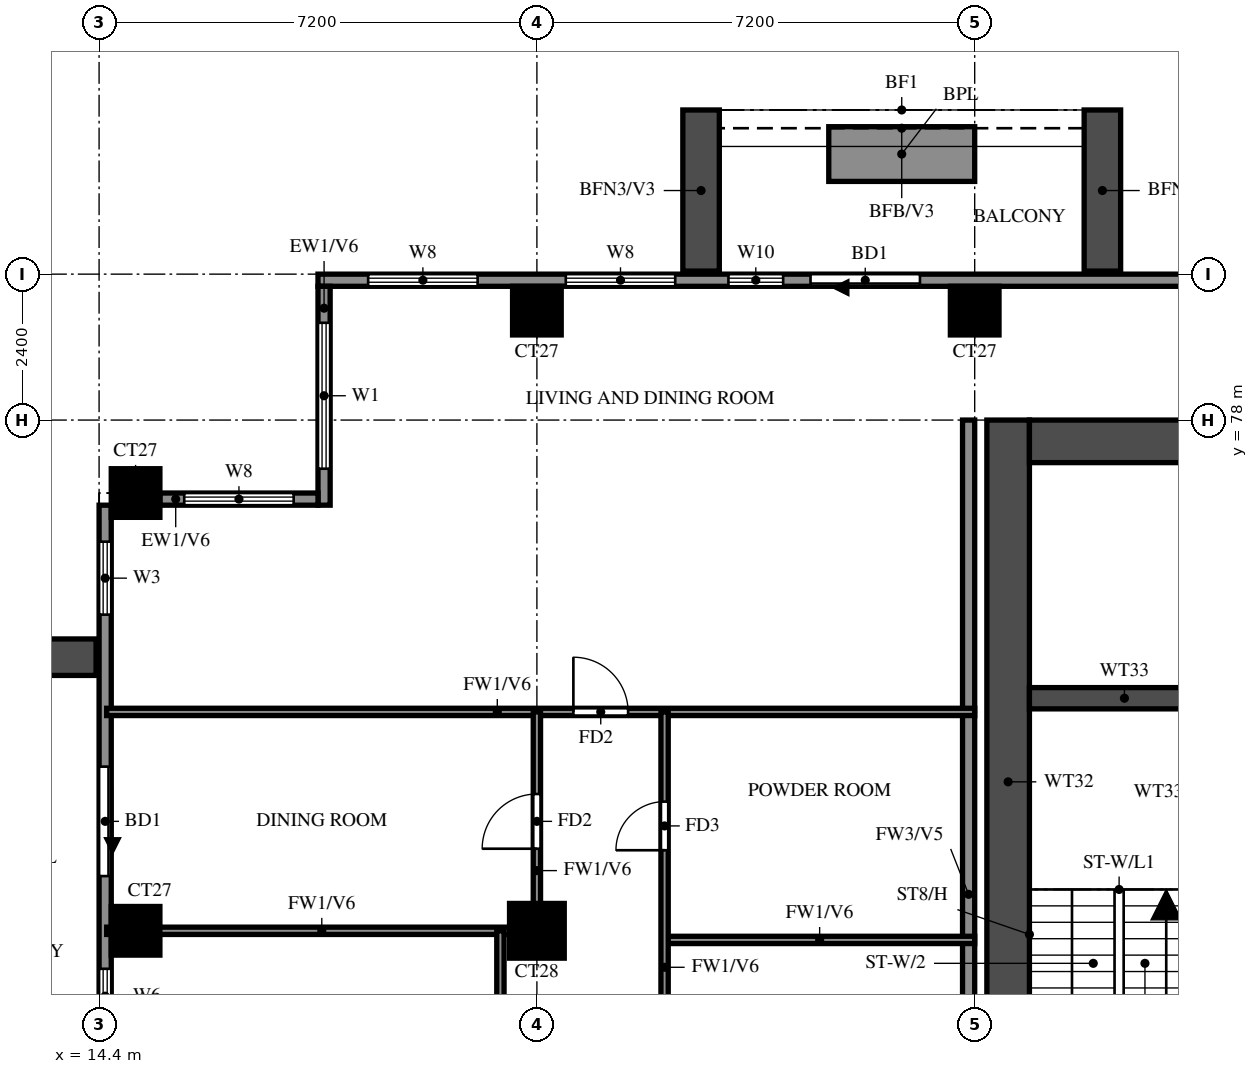
"""IFC4 building model, lengths in metres.
Left out: names, types, materials, properties, quantities, classifications, styles, units other than length and angle.
Written with IfcOpenShell. Run it as: python <this file> out.ifc"""

import sys

from ifc_helpers import new_model, si_unit, direction, frame, frame_2d, origin, origin_2d, place, context, subcontext, project, spatial, rectangle, extrude, source, transform, mapped, element, fill, save


model = new_model("IFC4")
c1 = context("Model", 3, precision=1e-05, world=origin(), true_north=direction((0.0, 1.0)))
c2 = subcontext(c1, "Body", "Model", "MODEL_VIEW")
j1 = project(units=[si_unit("LENGTHUNIT", "METRE"), si_unit("PLANEANGLEUNIT", "RADIAN")], contexts=[c1])
p1 = place(None, origin())
s1 = spatial("IfcSite", under=j1, at=p1, CompositionType="ELEMENT")
p2 = place(p1, origin())
s2 = spatial("IfcBuilding", under=s1, at=p2, CompositionType="ELEMENT")
p3 = place(p2, frame((0.0, 0.0, 202.5)))
s3 = spatial("IfcBuildingStorey", under=s2, at=p3, CompositionType="ELEMENT", Elevation=202.5)
m1 = source(origin(), c2, "Body", "SweptSolid", [
    extrude(rectangle(XDim=0.8, YDim=0.8, at=origin_2d()), origin(), (0.0, 0.0, 1.0), 3.1),
])
p4 = place(p3, frame((15.0, 69.6, 0.0), z_axis=(0.0, 0.0, 1.0), x_axis=(1.0, 0.0, 0.0)))
e1 = element("IfcColumn", 1, at=p4, inside=s3, PredefinedType="COLUMN", context=c2, shape_type="MappedRepresentation", body=[
    mapped(m1, transform((0.0, 0.0, 0.0))),
])
m2 = source(origin(), c2, "Body", "SweptSolid", [
    extrude(rectangle(XDim=0.9, YDim=0.9, at=origin_2d()), origin(), (0.0, 0.0, 1.0), 3.1),
])
p5 = place(p3, frame((21.6, 69.6, 0.0), z_axis=(0.0, 0.0, 1.0), x_axis=(1.0, 0.0, 0.0)))
e2 = element("IfcColumn", 2, at=p5, inside=s3, PredefinedType="COLUMN", context=c2, shape_type="MappedRepresentation", body=[
    mapped(m2, transform((0.0, 0.0, 0.0))),
])
for number, where, z_axis, x_axis in (
    (3, (15.0, 76.8, 0.0), (0.0, 0.0, 1.0), (1.0, 0.0, 0.0)),
    (4, (21.6, 79.8, 0.0), (0.0, 0.0, 1.0), (1.0, 0.0, 0.0)),
    (5, (28.8, 79.8, 0.0), (0.0, 0.0, 1.0), (1.0, 0.0, 0.0)),
):
    element("IfcColumn", number, at=place(p3, frame(where, z_axis=z_axis, x_axis=x_axis)), inside=s3, PredefinedType="COLUMN", context=c2, shape_type="MappedRepresentation", body=[
        mapped(m1, transform((0.0, 0.0, 0.0))),
    ])
p6 = place(p3, frame((29.35, 66.1, 0.0), z_axis=(0.0, 0.0, 1.0), x_axis=(0.0, 1.0, 0.0)))
e6 = element("IfcWall", 6, at=p6, inside=s3, PredefinedType="SHEAR", context=c2, shape_type="SweptSolid", body=[
    extrude(rectangle(XDim=11.9, YDim=0.7, at=frame_2d((5.95, 0.0))), origin(), (0.0, 0.0, 1.0), 3.1),
])
p7 = place(p3, frame((29.7, 77.65, 0.0), z_axis=(0.0, 0.0, 1.0), x_axis=(1.0, 0.0, 0.0)))
e7 = element("IfcWall", 7, at=p7, inside=s3, PredefinedType="SHEAR", context=c2, shape_type="SweptSolid", body=[
    extrude(rectangle(XDim=41.4, YDim=0.7, at=frame_2d((20.7, 0.0))), origin(), (0.0, 0.0, 1.0), 3.1),
])
p8 = place(p3, frame((29.7, 73.425, 0.0), z_axis=(0.0, 0.0, 1.0), x_axis=(1.0, 0.0, 0.0)))
e8 = element("IfcWall", 8, at=p8, inside=s3, PredefinedType="SHEAR", context=c2, shape_type="SweptSolid", body=[
    extrude(rectangle(XDim=3.125, YDim=0.35, at=frame_2d((1.562, 0.0))), origin(), (0.0, 0.0, 1.0), 3.1),
])
p9 = place(p3, frame((82.6, 80.3, 0.0), z_axis=(0.0, 0.0, 1.0), x_axis=(-1.0, 0.0, 0.0)))
e9 = element("IfcWall", 9, at=p9, inside=s3, PredefinedType="SOLIDWALL", context=c2, shape_type="SweptSolid", body=[
    extrude(rectangle(XDim=64.6, YDim=0.2, at=frame_2d((32.3, 0.0))), origin(), (0.0, 0.0, 1.0), 3.1),
])
p10 = place(p9, frame((54.7, 0.0, 0.0)))
e10 = element("IfcOpeningElement", 10, at=p10, cuts=e9, PredefinedType="OPENING", context=c2, shape_type="SweptSolid", body=[
    extrude(rectangle(XDim=1.8, YDim=2.4, at=frame_2d((0.9, 1.2))), frame((0.0, 0.11, 0.0), z_axis=(0.0, -1.0, 0.0), x_axis=(1.0, 0.0, 0.0)), (0.0, 0.0, 1.0), 0.22),
])
p11 = place(p9, frame((56.95, 0.0, 0.6)))
e11 = element("IfcOpeningElement", 11, at=p11, cuts=e9, PredefinedType="OPENING", context=c2, shape_type="SweptSolid", body=[
    extrude(rectangle(XDim=0.9, YDim=2.4, at=frame_2d((0.45, 1.2))), frame((0.0, 0.11, 0.0), z_axis=(0.0, -1.0, 0.0), x_axis=(1.0, 0.0, 0.0)), (0.0, 0.0, 1.0), 0.22),
])
p12 = place(p9, frame((58.725, 0.0, 0.6)))
e12 = element("IfcOpeningElement", 12, at=p12, cuts=e9, PredefinedType="OPENING", context=c2, shape_type="SweptSolid", body=[
    extrude(rectangle(XDim=1.8, YDim=2.4, at=frame_2d((0.9, 1.2))), frame((0.0, 0.11, 0.0), z_axis=(0.0, -1.0, 0.0), x_axis=(1.0, 0.0, 0.0)), (0.0, 0.0, 1.0), 0.22),
])
p13 = place(p9, frame((61.975, 0.0, 0.6)))
e13 = element("IfcOpeningElement", 13, at=p13, cuts=e9, PredefinedType="OPENING", context=c2, shape_type="SweptSolid", body=[
    extrude(rectangle(XDim=1.8, YDim=2.4, at=frame_2d((0.9, 1.2))), frame((0.0, 0.11, 0.0), z_axis=(0.0, -1.0, 0.0), x_axis=(1.0, 0.0, 0.0)), (0.0, 0.0, 1.0), 0.22),
])
p14 = place(p9, frame((0.725, 0.0, 0.6)))
e14 = element("IfcOpeningElement", 14, at=p14, cuts=e9, PredefinedType="OPENING", context=c2, shape_type="SweptSolid", body=[
    extrude(rectangle(XDim=1.8, YDim=2.4, at=frame_2d((0.9, 1.2))), frame((0.0, 0.11, 0.0), z_axis=(0.0, -1.0, 0.0), x_axis=(1.0, 0.0, 0.0)), (0.0, 0.0, 1.0), 0.22),
])
p15 = place(p9, frame((4.35, 0.0, 0.6)))
e15 = element("IfcOpeningElement", 15, at=p15, cuts=e9, PredefinedType="OPENING", context=c2, shape_type="SweptSolid", body=[
    extrude(rectangle(XDim=2.4, YDim=2.4, at=frame_2d((1.2, 1.2))), frame((0.0, 0.11, 0.0), z_axis=(0.0, -1.0, 0.0), x_axis=(1.0, 0.0, 0.0)), (0.0, 0.0, 1.0), 0.22),
])
p16 = place(p9, frame((7.25, 0.0, 0.6)))
e16 = element("IfcOpeningElement", 16, at=p16, cuts=e9, PredefinedType="OPENING", context=c2, shape_type="SweptSolid", body=[
    extrude(rectangle(XDim=2.4, YDim=2.4, at=frame_2d((1.2, 1.2))), frame((0.0, 0.11, 0.0), z_axis=(0.0, -1.0, 0.0), x_axis=(1.0, 0.0, 0.0)), (0.0, 0.0, 1.0), 0.22),
])
p17 = place(p3, frame((18.1, 80.2, 0.0), z_axis=(0.0, 0.0, 1.0), x_axis=(0.0, -1.0, 0.0)))
e17 = element("IfcWall", 17, at=p17, inside=s3, PredefinedType="SOLIDWALL", context=c2, shape_type="SweptSolid", body=[
    extrude(rectangle(XDim=3.6, YDim=0.2, at=frame_2d((1.8, 0.0))), origin(), (0.0, 0.0, 1.0), 3.1),
])
p18 = place(p17, frame((0.6, 0.0, 0.6)))
e18 = element("IfcOpeningElement", 18, at=p18, cuts=e17, PredefinedType="OPENING", context=c2, shape_type="SweptSolid", body=[
    extrude(rectangle(XDim=2.4, YDim=2.4, at=frame_2d((1.2, 1.2))), frame((0.0, 0.11, 0.0), z_axis=(0.0, -1.0, 0.0), x_axis=(1.0, 0.0, 0.0)), (0.0, 0.0, 1.0), 0.22),
])
p19 = place(p3, frame((18.0, 76.7, 0.0), z_axis=(0.0, 0.0, 1.0), x_axis=(-1.0, 0.0, 0.0)))
e19 = element("IfcWall", 19, at=p19, inside=s3, PredefinedType="SOLIDWALL", context=c2, shape_type="SweptSolid", body=[
    extrude(rectangle(XDim=2.6, YDim=0.2, at=frame_2d((1.3, 0.0))), origin(), (0.0, 0.0, 1.0), 3.1),
])
p20 = place(p19, frame((0.4, 0.0, 0.6)))
e20 = element("IfcOpeningElement", 20, at=p20, cuts=e19, PredefinedType="OPENING", context=c2, shape_type="SweptSolid", body=[
    extrude(rectangle(XDim=1.8, YDim=2.4, at=frame_2d((0.9, 1.2))), frame((0.0, 0.11, 0.0), z_axis=(0.0, -1.0, 0.0), x_axis=(1.0, 0.0, 0.0)), (0.0, 0.0, 1.0), 0.22),
])
p21 = place(p3, frame((14.5, 76.6, 0.0), z_axis=(0.0, 0.0, 1.0), x_axis=(0.0, -1.0, 0.0)))
e21 = element("IfcWall", 21, at=p21, inside=s3, PredefinedType="SOLIDWALL", context=c2, shape_type="SweptSolid", body=[
    extrude(rectangle(XDim=33.4, YDim=0.2, at=frame_2d((16.7, 0.0))), origin(), (0.0, 0.0, 1.0), 3.1),
])
p22 = place(p21, frame((4.3, 0.0, 0.0)))
e22 = element("IfcOpeningElement", 22, at=p22, cuts=e21, PredefinedType="OPENING", context=c2, shape_type="SweptSolid", body=[
    extrude(rectangle(XDim=1.8, YDim=2.4, at=frame_2d((0.9, 1.2))), frame((0.0, 0.11, 0.0), z_axis=(0.0, -1.0, 0.0), x_axis=(1.0, 0.0, 0.0)), (0.0, 0.0, 1.0), 0.22),
])
p23 = place(p21, frame((18.7, 0.0, 0.0)))
e23 = element("IfcOpeningElement", 23, at=p23, cuts=e21, PredefinedType="OPENING", context=c2, shape_type="SweptSolid", body=[
    extrude(rectangle(XDim=1.8, YDim=2.4, at=frame_2d((0.9, 1.2))), frame((0.0, 0.11, 0.0), z_axis=(0.0, -1.0, 0.0), x_axis=(1.0, 0.0, 0.0)), (0.0, 0.0, 1.0), 0.22),
])
p24 = place(p21, frame((29.875, 0.0, 0.6)))
e24 = element("IfcOpeningElement", 24, at=p24, cuts=e21, PredefinedType="OPENING", context=c2, shape_type="SweptSolid", body=[
    extrude(rectangle(XDim=2.4, YDim=2.4, at=frame_2d((1.2, 1.2))), frame((0.0, 0.11, 0.0), z_axis=(0.0, -1.0, 0.0), x_axis=(1.0, 0.0, 0.0)), (0.0, 0.0, 1.0), 0.22),
])
p25 = place(p21, frame((25.425, 0.0, 0.6)))
e25 = element("IfcOpeningElement", 25, at=p25, cuts=e21, PredefinedType="OPENING", context=c2, shape_type="SweptSolid", body=[
    extrude(rectangle(XDim=2.4, YDim=2.4, at=frame_2d((1.2, 1.2))), frame((0.0, 0.11, 0.0), z_axis=(0.0, -1.0, 0.0), x_axis=(1.0, 0.0, 0.0)), (0.0, 0.0, 1.0), 0.22),
])
p26 = place(p21, frame((21.875, 0.0, 0.6)))
e26 = element("IfcOpeningElement", 26, at=p26, cuts=e21, PredefinedType="OPENING", context=c2, shape_type="SweptSolid", body=[
    extrude(rectangle(XDim=1.2, YDim=2.4, at=frame_2d((0.6, 1.2))), frame((0.0, 0.11, 0.0), z_axis=(0.0, -1.0, 0.0), x_axis=(1.0, 0.0, 0.0)), (0.0, 0.0, 1.0), 0.22),
])
p27 = place(p21, frame((23.95, 0.0, 0.6)))
e27 = element("IfcOpeningElement", 27, at=p27, cuts=e21, PredefinedType="OPENING", context=c2, shape_type="SweptSolid", body=[
    extrude(rectangle(XDim=0.9, YDim=2.4, at=frame_2d((0.45, 1.2))), frame((0.0, 0.11, 0.0), z_axis=(0.0, -1.0, 0.0), x_axis=(1.0, 0.0, 0.0)), (0.0, 0.0, 1.0), 0.22),
])
p28 = place(p21, frame((14.675, 0.0, 0.6)))
e28 = element("IfcOpeningElement", 28, at=p28, cuts=e21, PredefinedType="OPENING", context=c2, shape_type="SweptSolid", body=[
    extrude(rectangle(XDim=1.8, YDim=2.4, at=frame_2d((0.9, 1.2))), frame((0.0, 0.11, 0.0), z_axis=(0.0, -1.0, 0.0), x_axis=(1.0, 0.0, 0.0)), (0.0, 0.0, 1.0), 0.22),
])
p29 = place(p21, frame((11.025, 0.0, 0.6)))
e29 = element("IfcOpeningElement", 29, at=p29, cuts=e21, PredefinedType="OPENING", context=c2, shape_type="SweptSolid", body=[
    extrude(rectangle(XDim=2.4, YDim=2.4, at=frame_2d((1.2, 1.2))), frame((0.0, 0.11, 0.0), z_axis=(0.0, -1.0, 0.0), x_axis=(1.0, 0.0, 0.0)), (0.0, 0.0, 1.0), 0.22),
])
p30 = place(p21, frame((7.625, 0.0, 1.5)))
e30 = element("IfcOpeningElement", 30, at=p30, cuts=e21, PredefinedType="OPENING", context=c2, shape_type="SweptSolid", body=[
    extrude(rectangle(XDim=0.9, YDim=0.9, at=frame_2d((0.45, 0.45))), frame((0.0, 0.11, 0.0), z_axis=(0.0, -1.0, 0.0), x_axis=(1.0, 0.0, 0.0)), (0.0, 0.0, 1.0), 0.22),
])
p31 = place(p21, frame((9.55, 0.0, 1.5)))
e31 = element("IfcOpeningElement", 31, at=p31, cuts=e21, PredefinedType="OPENING", context=c2, shape_type="SweptSolid", body=[
    extrude(rectangle(XDim=0.9, YDim=0.9, at=frame_2d((0.45, 0.45))), frame((0.0, 0.11, 0.0), z_axis=(0.0, -1.0, 0.0), x_axis=(1.0, 0.0, 0.0)), (0.0, 0.0, 1.0), 0.22),
])
p32 = place(p21, frame((0.6, 0.0, 0.6)))
e32 = element("IfcOpeningElement", 32, at=p32, cuts=e21, PredefinedType="OPENING", context=c2, shape_type="SweptSolid", body=[
    extrude(rectangle(XDim=1.2, YDim=2.4, at=frame_2d((0.6, 1.2))), frame((0.0, 0.11, 0.0), z_axis=(0.0, -1.0, 0.0), x_axis=(1.0, 0.0, 0.0)), (0.0, 0.0, 1.0), 0.22),
])
for number, where, z_axis, x_axis in (
    (33, (30.9, 80.45, 0.0), (0.0, 0.0, 1.0), (0.0, 1.0, 0.0)),
    (34, (24.3, 80.45, 0.0), (0.0, 0.0, 1.0), (0.0, 1.0, 0.0)),
):
    element("IfcWall", number, at=place(p3, frame(where, z_axis=z_axis, x_axis=x_axis)), inside=s3, PredefinedType="SOLIDWALL", context=c2, shape_type="SweptSolid", body=[
        extrude(rectangle(XDim=2.65, YDim=0.6, at=frame_2d((1.325, 0.0))), origin(), (0.0, 0.0, 1.0), 2.75),
    ])
p33 = place(p3, frame((28.8, 82.375, 0.0), z_axis=(0.0, 0.0, 1.0), x_axis=(-1.0, 0.0, 0.0)))
e35 = element("IfcWall", 35, at=p33, inside=s3, PredefinedType="SOLIDWALL", context=c2, shape_type="SweptSolid", body=[
    extrude(rectangle(XDim=2.4, YDim=0.9, at=frame_2d((1.2, 0.0))), origin(), (0.0, 0.0, 1.0), 0.9),
])
p34 = place(p3, frame((14.35, 74.1, 0.0), z_axis=(0.0, 0.0, 1.0), x_axis=(-1.0, 0.0, 0.0)))
e36 = element("IfcWall", 36, at=p34, inside=s3, PredefinedType="SOLIDWALL", context=c2, shape_type="SweptSolid", body=[
    extrude(rectangle(XDim=2.65, YDim=0.6, at=frame_2d((1.325, 0.0))), origin(), (0.0, 0.0, 1.0), 2.75),
])
p35 = place(p3, frame((28.7, 62.4, 0.0), z_axis=(0.0, 0.0, 1.0), x_axis=(0.0, 1.0, 0.0)))
e37 = element("IfcWall", 37, at=p35, inside=s3, PredefinedType="SOLIDWALL", context=c2, shape_type="SweptSolid", body=[
    extrude(rectangle(XDim=15.6, YDim=0.2, at=frame_2d((7.8, 0.0))), origin(), (0.0, 0.0, 1.0), 3.1),
])
p36 = place(p3, frame((23.7, 69.45, 0.0), z_axis=(0.0, 0.0, 1.0), x_axis=(1.0, 0.0, 0.0)))
e38 = element("IfcWall", 38, at=p36, inside=s3, PredefinedType="PARTITIONING", context=c2, shape_type="SweptSolid", body=[
    extrude(rectangle(XDim=5.1, YDim=0.12, at=frame_2d((2.55, 0.0))), origin(), (0.0, 0.0, 1.0), 3.1),
])
p37 = place(p3, frame((14.525, 69.6, 0.0), z_axis=(0.0, 0.0, 1.0), x_axis=(1.0, 0.0, 0.0)))
e39 = element("IfcWall", 39, at=p37, inside=s3, PredefinedType="PARTITIONING", context=c2, shape_type="SweptSolid", body=[
    extrude(rectangle(XDim=7.075, YDim=0.12, at=frame_2d((3.538, 0.0))), origin(), (0.0, 0.0, 1.0), 3.1),
])
p38 = place(p3, frame((14.525, 73.2, 0.0), z_axis=(0.0, 0.0, 1.0), x_axis=(1.0, 0.0, 0.0)))
e40 = element("IfcWall", 40, at=p38, inside=s3, PredefinedType="PARTITIONING", context=c2, shape_type="SweptSolid", body=[
    extrude(rectangle(XDim=14.275, YDim=0.12, at=frame_2d((7.138, 0.0))), origin(), (0.0, 0.0, 1.0), 3.1),
])
p39 = place(p38, frame((7.675, 0.0, 0.0)))
e41 = element("IfcOpeningElement", 41, at=p39, cuts=e40, PredefinedType="OPENING", context=c2, shape_type="SweptSolid", body=[
    extrude(rectangle(XDim=0.9, YDim=2.1, at=frame_2d((0.45, 1.05))), frame((0.0, 0.07, 0.0), z_axis=(0.0, -1.0, 0.0), x_axis=(1.0, 0.0, 0.0)), (0.0, 0.0, 1.0), 0.14),
])
p40 = place(p3, frame((21.0, 66.0, 0.0), z_axis=(0.0, 0.0, 1.0), x_axis=(0.0, 1.0, 0.0)))
e42 = element("IfcWall", 42, at=p40, inside=s3, PredefinedType="PARTITIONING", context=c2, shape_type="SweptSolid", body=[
    extrude(rectangle(XDim=3.6, YDim=0.12, at=frame_2d((1.8, 0.0))), origin(), (0.0, 0.0, 1.0), 3.1),
])
p41 = place(p3, frame((21.6, 69.6, 0.0), z_axis=(0.0, 0.0, 1.0), x_axis=(0.0, 1.0, 0.0)))
e43 = element("IfcWall", 43, at=p41, inside=s3, PredefinedType="PARTITIONING", context=c2, shape_type="SweptSolid", body=[
    extrude(rectangle(XDim=3.6, YDim=0.12, at=frame_2d((1.8, 0.0))), origin(), (0.0, 0.0, 1.0), 3.1),
])
p42 = place(p41, frame((1.35, 0.0, 0.0)))
e44 = element("IfcOpeningElement", 44, at=p42, cuts=e43, PredefinedType="OPENING", context=c2, shape_type="SweptSolid", body=[
    extrude(rectangle(XDim=0.9, YDim=2.1, at=frame_2d((0.45, 1.05))), frame((0.0, 0.07, 0.0), z_axis=(0.0, -1.0, 0.0), x_axis=(1.0, 0.0, 0.0)), (0.0, 0.0, 1.0), 0.14),
])
p43 = place(p3, frame((23.7, 64.8, 0.0), z_axis=(0.0, 0.0, 1.0), x_axis=(0.0, 1.0, 0.0)))
e45 = element("IfcWall", 45, at=p43, inside=s3, PredefinedType="PARTITIONING", context=c2, shape_type="SweptSolid", body=[
    extrude(rectangle(XDim=8.4, YDim=0.12, at=frame_2d((4.2, 0.0))), origin(), (0.0, 0.0, 1.0), 3.1),
])
p44 = place(p43, frame((6.125, 0.0, 0.0)))
e46 = element("IfcOpeningElement", 46, at=p44, cuts=e45, PredefinedType="OPENING", context=c2, shape_type="SweptSolid", body=[
    extrude(rectangle(XDim=0.8, YDim=2.1, at=frame_2d((0.4, 1.05))), frame((0.0, 0.07, 0.0), z_axis=(0.0, -1.0, 0.0), x_axis=(1.0, 0.0, 0.0)), (0.0, 0.0, 1.0), 0.14),
])
p45 = place(p10, origin())
e47 = element("IfcDoor", 47, at=p45, inside=s3, OperationType="DOUBLE_DOOR_SLIDING", PredefinedType="DOOR", context=c2, shape_type="SweptSolid", body=[
    extrude(rectangle(XDim=1.8, YDim=2.4, at=frame_2d((0.9, 1.2))), frame((0.0, 0.025, 0.0), z_axis=(0.0, -1.0, 0.0), x_axis=(1.0, 0.0, 0.0)), (0.0, 0.0, 1.0), 0.05),
])
fill(e10, e47)
p46 = place(p11, origin())
e48 = element("IfcWindow", 48, at=p46, inside=s3, PartitioningType="SINGLE_PANEL", PredefinedType="WINDOW", context=c2, shape_type="SweptSolid", body=[
    extrude(rectangle(XDim=0.9, YDim=2.4, at=frame_2d((0.45, 1.2))), frame((0.0, 0.03, 0.0), z_axis=(0.0, -1.0, 0.0), x_axis=(1.0, 0.0, 0.0)), (0.0, 0.0, 1.0), 0.06),
])
fill(e11, e48)
p47 = place(p12, origin())
e49 = element("IfcWindow", 49, at=p47, inside=s3, PartitioningType="DOUBLE_PANEL_VERTICAL", PredefinedType="WINDOW", context=c2, shape_type="SweptSolid", body=[
    extrude(rectangle(XDim=1.8, YDim=2.4, at=frame_2d((0.9, 1.2))), frame((0.0, 0.03, 0.0), z_axis=(0.0, -1.0, 0.0), x_axis=(1.0, 0.0, 0.0)), (0.0, 0.0, 1.0), 0.06),
])
fill(e12, e49)
p48 = place(p13, origin())
e50 = element("IfcWindow", 50, at=p48, inside=s3, PartitioningType="DOUBLE_PANEL_VERTICAL", PredefinedType="WINDOW", context=c2, shape_type="SweptSolid", body=[
    extrude(rectangle(XDim=1.8, YDim=2.4, at=frame_2d((0.9, 1.2))), frame((0.0, 0.03, 0.0), z_axis=(0.0, -1.0, 0.0), x_axis=(1.0, 0.0, 0.0)), (0.0, 0.0, 1.0), 0.06),
])
fill(e13, e50)
p49 = place(p18, origin())
e51 = element("IfcWindow", 51, at=p49, inside=s3, PartitioningType="DOUBLE_PANEL_VERTICAL", PredefinedType="WINDOW", context=c2, shape_type="SweptSolid", body=[
    extrude(rectangle(XDim=2.4, YDim=2.4, at=frame_2d((1.2, 1.2))), frame((0.0, 0.03, 0.0), z_axis=(0.0, -1.0, 0.0), x_axis=(1.0, 0.0, 0.0)), (0.0, 0.0, 1.0), 0.06),
])
fill(e18, e51)
p50 = place(p20, origin())
e52 = element("IfcWindow", 52, at=p50, inside=s3, PartitioningType="DOUBLE_PANEL_VERTICAL", PredefinedType="WINDOW", context=c2, shape_type="SweptSolid", body=[
    extrude(rectangle(XDim=1.8, YDim=2.4, at=frame_2d((0.9, 1.2))), frame((0.0, 0.03, 0.0), z_axis=(0.0, -1.0, 0.0), x_axis=(1.0, 0.0, 0.0)), (0.0, 0.0, 1.0), 0.06),
])
fill(e20, e52)
p51 = place(p22, origin())
e53 = element("IfcDoor", 53, at=p51, inside=s3, OperationType="DOUBLE_DOOR_SLIDING", PredefinedType="DOOR", context=c2, shape_type="SweptSolid", body=[
    extrude(rectangle(XDim=1.8, YDim=2.4, at=frame_2d((0.9, 1.2))), frame((0.0, 0.025, 0.0), z_axis=(0.0, -1.0, 0.0), x_axis=(1.0, 0.0, 0.0)), (0.0, 0.0, 1.0), 0.05),
])
fill(e22, e53)
p52 = place(p30, origin())
e54 = element("IfcWindow", 54, at=p52, inside=s3, PartitioningType="SINGLE_PANEL", PredefinedType="WINDOW", context=c2, shape_type="SweptSolid", body=[
    extrude(rectangle(XDim=0.9, YDim=0.9, at=frame_2d((0.45, 0.45))), frame((0.0, 0.03, 0.0), z_axis=(0.0, -1.0, 0.0), x_axis=(1.0, 0.0, 0.0)), (0.0, 0.0, 1.0), 0.06),
])
fill(e30, e54)
p53 = place(p32, origin())
e55 = element("IfcWindow", 55, at=p53, inside=s3, PartitioningType="SINGLE_PANEL", PredefinedType="WINDOW", context=c2, shape_type="SweptSolid", body=[
    extrude(rectangle(XDim=1.2, YDim=2.4, at=frame_2d((0.6, 1.2))), frame((0.0, 0.03, 0.0), z_axis=(0.0, -1.0, 0.0), x_axis=(1.0, 0.0, 0.0)), (0.0, 0.0, 1.0), 0.06),
])
fill(e32, e55)
p54 = place(p42, origin())
e56 = element("IfcDoor", 56, at=p54, inside=s3, OperationType="SINGLE_SWING_RIGHT", PredefinedType="DOOR", context=c2, shape_type="SweptSolid", body=[
    extrude(rectangle(XDim=0.9, YDim=2.1, at=frame_2d((0.45, 1.05))), frame((0.0, 0.025, 0.0), z_axis=(0.0, -1.0, 0.0), x_axis=(1.0, 0.0, 0.0)), (0.0, 0.0, 1.0), 0.05),
])
fill(e44, e56)
p55 = place(p39, origin())
e57 = element("IfcDoor", 57, at=p55, inside=s3, OperationType="SINGLE_SWING_LEFT", PredefinedType="DOOR", context=c2, shape_type="SweptSolid", body=[
    extrude(rectangle(XDim=0.9, YDim=2.1, at=frame_2d((0.45, 1.05))), frame((0.0, 0.025, 0.0), z_axis=(0.0, -1.0, 0.0), x_axis=(1.0, 0.0, 0.0)), (0.0, 0.0, 1.0), 0.05),
])
fill(e41, e57)
p56 = place(p44, origin())
e58 = element("IfcDoor", 58, at=p56, inside=s3, OperationType="SINGLE_SWING_RIGHT", PredefinedType="DOOR", context=c2, shape_type="SweptSolid", body=[
    extrude(rectangle(XDim=0.8, YDim=2.1, at=frame_2d((0.4, 1.05))), frame((0.0, 0.025, 0.0), z_axis=(0.0, -1.0, 0.0), x_axis=(1.0, 0.0, 0.0)), (0.0, 0.0, 1.0), 0.05),
])
fill(e46, e58)
save(model, sys.argv[1])
